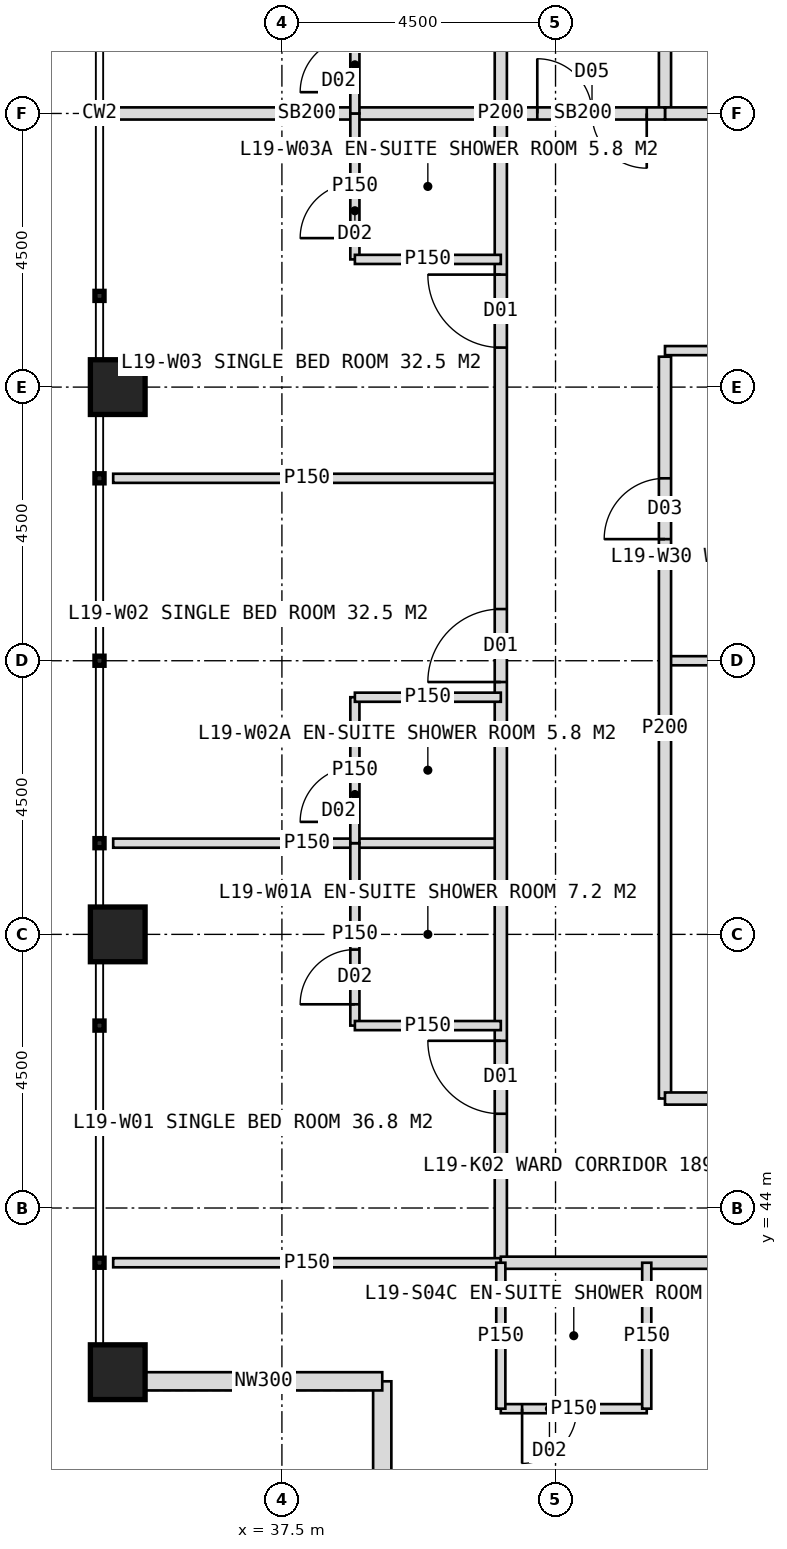
"""IFC4 building model, lengths in metres.
Left out: names, types, materials, properties, quantities, classifications, styles, units other than length and angle.
Written with IfcOpenShell. Run it as: python <this file> out.ifc"""

import sys

from ifc_helpers import new_model, si_unit, direction, frame, frame_2d, origin, origin_2d, place, context, subcontext, project, spatial, rectangle, hollow_rectangle, extrude, element, fill, save


model = new_model("IFC4")
c1 = context("Model", 3, precision=1e-05, world=origin(), true_north=direction((0.0, 1.0)))
c2 = subcontext(c1, "Body", "Model", "MODEL_VIEW")
j1 = project(units=[si_unit("LENGTHUNIT", "METRE"), si_unit("PLANEANGLEUNIT", "RADIAN")], contexts=[c1])
p1 = place(None, origin())
s1 = spatial("IfcSite", under=j1, at=p1, CompositionType="ELEMENT")
p2 = place(p1, origin())
s2 = spatial("IfcBuilding", under=s1, at=p2, CompositionType="ELEMENT")
p3 = place(p2, frame((0.0, 0.0, 83.0)))
s3 = spatial("IfcBuildingStorey", under=s2, at=p3, CompositionType="ELEMENT", Elevation=83.0)
for number, where, z_axis, x_axis in (
    (1, (34.8, 41.3, 0.0), (0.0, 0.0, 1.0), (1.0, 0.0, 0.0)),
    (2, (34.8, 48.5, 0.0), (0.0, 0.0, 1.0), (1.0, 0.0, 0.0)),
    (3, (34.8, 57.5, 0.0), (0.0, 0.0, 1.0), (1.0, 0.0, 0.0)),
):
    element("IfcColumn", number, at=place(p3, frame(where, z_axis=z_axis, x_axis=x_axis)), inside=s3, PredefinedType="COLUMN", context=c2, shape_type="SweptSolid", body=[
        extrude(hollow_rectangle(XDim=0.9, YDim=0.9, WallThickness=0.08, at=origin_2d()), origin(), (0.0, 0.0, 1.0), 4.0),
    ])
for number, where, z_axis, x_axis in (
    (4, (39.15, 37.25, 0.0), (0.0, 0.0, 1.0), (0.0, 1.0, 0.0)),
    (5, (39.15, 41.15, 0.0), (0.0, 0.0, 1.0), (-1.0, 0.0, 0.0)),
):
    element("IfcWall", number, at=place(p3, frame(where, z_axis=z_axis, x_axis=x_axis)), inside=s3, PredefinedType="ELEMENTEDWALL", context=c2, shape_type="SweptSolid", body=[
        extrude(rectangle(XDim=3.9, YDim=0.3, at=frame_2d((1.95, 0.0))), origin(), (0.0, 0.0, 1.0), 2.95),
    ])
for number, where, z_axis, x_axis in (
    (6, (41.1, 50.0, 0.0), (0.0, 0.0, 1.0), (-1.0, 0.0, 0.0)),
    (7, (41.1, 56.0, 0.0), (0.0, 0.0, 1.0), (-1.0, 0.0, 0.0)),
):
    element("IfcWall", number, at=place(p3, frame(where, z_axis=z_axis, x_axis=x_axis)), inside=s3, PredefinedType="PARTITIONING", context=c2, shape_type="SweptSolid", body=[
        extrude(rectangle(XDim=6.375, YDim=0.15, at=frame_2d((3.188, 0.0))), origin(), (0.0, 0.0, 1.0), 3.75),
    ])
p4 = place(p3, frame((41.1, 62.0, 0.0), z_axis=(0.0, 0.0, 1.0), x_axis=(-1.0, 0.0, 0.0)))
e8 = element("IfcWall", 8, at=p4, inside=s3, PredefinedType="SOLIDWALL", context=c2, shape_type="SweptSolid", body=[
    extrude(rectangle(XDim=6.375, YDim=0.2, at=frame_2d((3.188, 0.0))), origin(), (0.0, 0.0, 1.0), 2.75),
])
p5 = place(p3, frame((41.1, 43.1, 0.0), z_axis=(0.0, 0.0, 1.0), x_axis=(0.0, 1.0, 0.0)))
e9 = element("IfcWall", 9, at=p5, inside=s3, PredefinedType="PARTITIONING", context=c2, shape_type="SweptSolid", body=[
    extrude(rectangle(XDim=37.8, YDim=0.2, at=frame_2d((18.9, 0.0))), origin(), (0.0, 0.0, 1.0), 3.75),
])
p6 = place(p5, frame((2.45, 0.0, 0.0)))
e10 = element("IfcOpeningElement", 10, at=p6, cuts=e9, PredefinedType="OPENING", context=c2, shape_type="SweptSolid", body=[
    extrude(rectangle(XDim=1.2, YDim=2.2, at=frame_2d((0.6, 1.1))), frame((0.0, 0.11, 0.0), z_axis=(0.0, -1.0, 0.0), x_axis=(1.0, 0.0, 0.0)), (0.0, 0.0, 1.0), 0.22),
])
p7 = place(p5, frame((9.55, 0.0, 0.0)))
e11 = element("IfcOpeningElement", 11, at=p7, cuts=e9, PredefinedType="OPENING", context=c2, shape_type="SweptSolid", body=[
    extrude(rectangle(XDim=1.2, YDim=2.2, at=frame_2d((0.6, 1.1))), frame((0.0, 0.11, 0.0), z_axis=(0.0, -1.0, 0.0), x_axis=(1.0, 0.0, 0.0)), (0.0, 0.0, 1.0), 0.22),
])
p8 = place(p5, frame((15.05, 0.0, 0.0)))
e12 = element("IfcOpeningElement", 12, at=p8, cuts=e9, PredefinedType="OPENING", context=c2, shape_type="SweptSolid", body=[
    extrude(rectangle(XDim=1.2, YDim=2.2, at=frame_2d((0.6, 1.1))), frame((0.0, 0.11, 0.0), z_axis=(0.0, -1.0, 0.0), x_axis=(1.0, 0.0, 0.0)), (0.0, 0.0, 1.0), 0.22),
])
p9 = place(p5, frame((21.55, 0.0, 0.0)))
e13 = element("IfcOpeningElement", 13, at=p9, cuts=e9, PredefinedType="OPENING", context=c2, shape_type="SweptSolid", body=[
    extrude(rectangle(XDim=1.2, YDim=2.2, at=frame_2d((0.6, 1.1))), frame((0.0, 0.11, 0.0), z_axis=(0.0, -1.0, 0.0), x_axis=(1.0, 0.0, 0.0)), (0.0, 0.0, 1.0), 0.22),
])
p10 = place(p5, frame((33.95, 0.0, 0.0)))
e14 = element("IfcOpeningElement", 14, at=p10, cuts=e9, PredefinedType="OPENING", context=c2, shape_type="SweptSolid", body=[
    extrude(rectangle(XDim=1.2, YDim=2.2, at=frame_2d((0.6, 1.1))), frame((0.0, 0.11, 0.0), z_axis=(0.0, -1.0, 0.0), x_axis=(1.0, 0.0, 0.0)), (0.0, 0.0, 1.0), 0.22),
])
p11 = place(p3, frame((41.1, 43.1, 0.0), z_axis=(0.0, 0.0, 1.0), x_axis=(-1.0, 0.0, 0.0)))
e15 = element("IfcWall", 15, at=p11, inside=s3, PredefinedType="PARTITIONING", context=c2, shape_type="SweptSolid", body=[
    extrude(rectangle(XDim=6.375, YDim=0.15, at=frame_2d((3.188, 0.0))), origin(), (0.0, 0.0, 1.0), 3.75),
])
p12 = place(p3, frame((38.7, 47.0, 0.0), z_axis=(0.0, 0.0, 1.0), x_axis=(0.0, 1.0, 0.0)))
e16 = element("IfcWall", 16, at=p12, inside=s3, PredefinedType="PARTITIONING", context=c2, shape_type="SweptSolid", body=[
    extrude(rectangle(XDim=3.0, YDim=0.15, at=frame_2d((1.5, 0.0))), origin(), (0.0, 0.0, 1.0), 3.75),
])
p13 = place(p12, frame((0.35, 0.0, 0.0)))
e17 = element("IfcOpeningElement", 17, at=p13, cuts=e16, PredefinedType="OPENING", context=c2, shape_type="SweptSolid", body=[
    extrude(rectangle(XDim=0.9, YDim=2.1, at=frame_2d((0.45, 1.05))), frame((0.0, 0.085, 0.0), z_axis=(0.0, -1.0, 0.0), x_axis=(1.0, 0.0, 0.0)), (0.0, 0.0, 1.0), 0.17),
])
p14 = place(p3, frame((41.1, 47.0, 0.0), z_axis=(0.0, 0.0, 1.0), x_axis=(-1.0, 0.0, 0.0)))
e18 = element("IfcWall", 18, at=p14, inside=s3, PredefinedType="PARTITIONING", context=c2, shape_type="SweptSolid", body=[
    extrude(rectangle(XDim=2.4, YDim=0.15, at=frame_2d((1.2, 0.0))), origin(), (0.0, 0.0, 1.0), 3.75),
])
p15 = place(p3, frame((38.7, 50.0, 0.0), z_axis=(0.0, 0.0, 1.0), x_axis=(0.0, 1.0, 0.0)))
e19 = element("IfcWall", 19, at=p15, inside=s3, PredefinedType="PARTITIONING", context=c2, shape_type="SweptSolid", body=[
    extrude(rectangle(XDim=2.4, YDim=0.15, at=frame_2d((1.2, 0.0))), origin(), (0.0, 0.0, 1.0), 3.75),
])
p16 = place(p15, frame((0.35, 0.0, 0.0)))
e20 = element("IfcOpeningElement", 20, at=p16, cuts=e19, PredefinedType="OPENING", context=c2, shape_type="SweptSolid", body=[
    extrude(rectangle(XDim=0.9, YDim=2.1, at=frame_2d((0.45, 1.05))), frame((0.0, 0.085, 0.0), z_axis=(0.0, -1.0, 0.0), x_axis=(1.0, 0.0, 0.0)), (0.0, 0.0, 1.0), 0.17),
])
p17 = place(p3, frame((41.1, 52.4, 0.0), z_axis=(0.0, 0.0, 1.0), x_axis=(-1.0, 0.0, 0.0)))
e21 = element("IfcWall", 21, at=p17, inside=s3, PredefinedType="PARTITIONING", context=c2, shape_type="SweptSolid", body=[
    extrude(rectangle(XDim=2.4, YDim=0.15, at=frame_2d((1.2, 0.0))), origin(), (0.0, 0.0, 1.0), 3.75),
])
p18 = place(p3, frame((38.7, 59.6, 0.0), z_axis=(0.0, 0.0, 1.0), x_axis=(0.0, 1.0, 0.0)))
e22 = element("IfcWall", 22, at=p18, inside=s3, PredefinedType="PARTITIONING", context=c2, shape_type="SweptSolid", body=[
    extrude(rectangle(XDim=2.4, YDim=0.15, at=frame_2d((1.2, 0.0))), origin(), (0.0, 0.0, 1.0), 3.75),
])
p19 = place(p18, frame((0.35, 0.0, 0.0)))
e23 = element("IfcOpeningElement", 23, at=p19, cuts=e22, PredefinedType="OPENING", context=c2, shape_type="SweptSolid", body=[
    extrude(rectangle(XDim=0.9, YDim=2.1, at=frame_2d((0.45, 1.05))), frame((0.0, 0.085, 0.0), z_axis=(0.0, -1.0, 0.0), x_axis=(1.0, 0.0, 0.0)), (0.0, 0.0, 1.0), 0.17),
])
p20 = place(p3, frame((41.1, 59.6, 0.0), z_axis=(0.0, 0.0, 1.0), x_axis=(-1.0, 0.0, 0.0)))
e24 = element("IfcWall", 24, at=p20, inside=s3, PredefinedType="PARTITIONING", context=c2, shape_type="SweptSolid", body=[
    extrude(rectangle(XDim=2.4, YDim=0.15, at=frame_2d((1.2, 0.0))), origin(), (0.0, 0.0, 1.0), 3.75),
])
p21 = place(p3, frame((38.7, 62.0, 0.0), z_axis=(0.0, 0.0, 1.0), x_axis=(0.0, 1.0, 0.0)))
e25 = element("IfcWall", 25, at=p21, inside=s3, PredefinedType="PARTITIONING", context=c2, shape_type="SweptSolid", body=[
    extrude(rectangle(XDim=2.4, YDim=0.15, at=frame_2d((1.2, 0.0))), origin(), (0.0, 0.0, 1.0), 3.75),
])
p22 = place(p21, frame((0.35, 0.0, 0.0)))
e26 = element("IfcOpeningElement", 26, at=p22, cuts=e25, PredefinedType="OPENING", context=c2, shape_type="SweptSolid", body=[
    extrude(rectangle(XDim=0.9, YDim=2.1, at=frame_2d((0.45, 1.05))), frame((0.0, 0.085, 0.0), z_axis=(0.0, -1.0, 0.0), x_axis=(1.0, 0.0, 0.0)), (0.0, 0.0, 1.0), 0.17),
])
p23 = place(p3, frame((51.0, 53.0, 0.0), z_axis=(0.0, 0.0, 1.0), x_axis=(-1.0, 0.0, 0.0)))
e27 = element("IfcWall", 27, at=p23, inside=s3, PredefinedType="PARTITIONING", context=c2, shape_type="SweptSolid", body=[
    extrude(rectangle(XDim=7.2, YDim=0.15, at=frame_2d((3.6, 0.0))), origin(), (0.0, 0.0, 1.0), 3.75),
])
p24 = place(p3, frame((43.8, 45.8, 0.0), z_axis=(0.0, 0.0, 1.0), x_axis=(0.0, 1.0, 0.0)))
e28 = element("IfcWall", 28, at=p24, inside=s3, PredefinedType="PARTITIONING", context=c2, shape_type="SweptSolid", body=[
    extrude(rectangle(XDim=12.2, YDim=0.2, at=frame_2d((6.1, 0.0))), origin(), (0.0, 0.0, 1.0), 3.75),
])
p25 = place(p24, frame((9.2, 0.0, 0.0)))
e29 = element("IfcOpeningElement", 29, at=p25, cuts=e28, PredefinedType="OPENING", context=c2, shape_type="SweptSolid", body=[
    extrude(rectangle(XDim=1.0, YDim=2.1, at=frame_2d((0.5, 1.05))), frame((0.0, 0.11, 0.0), z_axis=(0.0, -1.0, 0.0), x_axis=(1.0, 0.0, 0.0)), (0.0, 0.0, 1.0), 0.22),
])
p26 = place(p3, frame((43.8, 62.0, 0.0), z_axis=(0.0, 0.0, 1.0), x_axis=(0.0, 1.0, 0.0)))
e30 = element("IfcWall", 30, at=p26, inside=s3, PredefinedType="PARTITIONING", context=c2, shape_type="SweptSolid", body=[
    extrude(rectangle(XDim=16.2, YDim=0.2, at=frame_2d((8.1, 0.0))), origin(), (0.0, 0.0, 1.0), 3.75),
])
p27 = place(p26, frame((3.25, 0.0, 0.0)))
e31 = element("IfcOpeningElement", 31, at=p27, cuts=e30, PredefinedType="OPENING", context=c2, shape_type="SweptSolid", body=[
    extrude(rectangle(XDim=1.0, YDim=2.1, at=frame_2d((0.5, 1.05))), frame((0.0, 0.11, 0.0), z_axis=(0.0, -1.0, 0.0), x_axis=(1.0, 0.0, 0.0)), (0.0, 0.0, 1.0), 0.22),
])
p28 = place(p26, frame((9.25, 0.0, 0.0)))
e32 = element("IfcOpeningElement", 32, at=p28, cuts=e30, PredefinedType="OPENING", context=c2, shape_type="SweptSolid", body=[
    extrude(rectangle(XDim=1.0, YDim=2.1, at=frame_2d((0.5, 1.05))), frame((0.0, 0.11, 0.0), z_axis=(0.0, -1.0, 0.0), x_axis=(1.0, 0.0, 0.0)), (0.0, 0.0, 1.0), 0.22),
])
p29 = place(p26, frame((13.6, 0.0, 0.0)))
e33 = element("IfcOpeningElement", 33, at=p29, cuts=e30, PredefinedType="OPENING", context=c2, shape_type="SweptSolid", body=[
    extrude(rectangle(XDim=1.0, YDim=2.1, at=frame_2d((0.5, 1.05))), frame((0.0, 0.11, 0.0), z_axis=(0.0, -1.0, 0.0), x_axis=(1.0, 0.0, 0.0)), (0.0, 0.0, 1.0), 0.22),
])
p30 = place(p3, frame((51.0, 58.1, 0.0), z_axis=(0.0, 0.0, 1.0), x_axis=(-1.0, 0.0, 0.0)))
e34 = element("IfcWall", 34, at=p30, inside=s3, PredefinedType="PARTITIONING", context=c2, shape_type="SweptSolid", body=[
    extrude(rectangle(XDim=7.2, YDim=0.15, at=frame_2d((3.6, 0.0))), origin(), (0.0, 0.0, 1.0), 3.75),
])
p31 = place(p30, frame((0.6, 0.0, 0.0)))
e35 = element("IfcOpeningElement", 35, at=p31, cuts=e34, PredefinedType="OPENING", context=c2, shape_type="SweptSolid", body=[
    extrude(rectangle(XDim=0.9, YDim=2.1, at=frame_2d((0.45, 1.05))), frame((0.0, 0.085, 0.0), z_axis=(0.0, -1.0, 0.0), x_axis=(1.0, 0.0, 0.0)), (0.0, 0.0, 1.0), 0.17),
])
p32 = place(p3, frame((51.0, 62.0, 0.0), z_axis=(0.0, 0.0, 1.0), x_axis=(-1.0, 0.0, 0.0)))
e36 = element("IfcWall", 36, at=p32, inside=s3, PredefinedType="SOLIDWALL", context=c2, shape_type="SweptSolid", body=[
    extrude(rectangle(XDim=7.2, YDim=0.2, at=frame_2d((3.6, 0.0))), origin(), (0.0, 0.0, 1.0), 2.75),
])
p33 = place(p3, frame((78.9, 43.1, 0.0), z_axis=(0.0, 0.0, 1.0), x_axis=(-1.0, 0.0, 0.0)))
e37 = element("IfcWall", 37, at=p33, inside=s3, PredefinedType="PARTITIONING", context=c2, shape_type="SweptSolid", body=[
    extrude(rectangle(XDim=37.8, YDim=0.2, at=frame_2d((18.9, 0.0))), origin(), (0.0, 0.0, 1.0), 3.75),
])
p34 = place(p33, frame((6.05, 0.0, 0.0)))
e38 = element("IfcOpeningElement", 38, at=p34, cuts=e37, PredefinedType="OPENING", context=c2, shape_type="SweptSolid", body=[
    extrude(rectangle(XDim=1.2, YDim=2.2, at=frame_2d((0.6, 1.1))), frame((0.0, 0.11, 0.0), z_axis=(0.0, -1.0, 0.0), x_axis=(1.0, 0.0, 0.0)), (0.0, 0.0, 1.0), 0.22),
])
p35 = place(p33, frame((12.55, 0.0, 0.0)))
e39 = element("IfcOpeningElement", 39, at=p35, cuts=e37, PredefinedType="OPENING", context=c2, shape_type="SweptSolid", body=[
    extrude(rectangle(XDim=1.2, YDim=2.2, at=frame_2d((0.6, 1.1))), frame((0.0, 0.11, 0.0), z_axis=(0.0, -1.0, 0.0), x_axis=(1.0, 0.0, 0.0)), (0.0, 0.0, 1.0), 0.22),
])
p36 = place(p33, frame((21.05, 0.0, 0.0)))
e40 = element("IfcOpeningElement", 40, at=p36, cuts=e37, PredefinedType="OPENING", context=c2, shape_type="SweptSolid", body=[
    extrude(rectangle(XDim=1.2, YDim=2.2, at=frame_2d((0.6, 1.1))), frame((0.0, 0.11, 0.0), z_axis=(0.0, -1.0, 0.0), x_axis=(1.0, 0.0, 0.0)), (0.0, 0.0, 1.0), 0.22),
])
p37 = place(p33, frame((27.55, 0.0, 0.0)))
e41 = element("IfcOpeningElement", 41, at=p37, cuts=e37, PredefinedType="OPENING", context=c2, shape_type="SweptSolid", body=[
    extrude(rectangle(XDim=1.2, YDim=2.2, at=frame_2d((0.6, 1.1))), frame((0.0, 0.11, 0.0), z_axis=(0.0, -1.0, 0.0), x_axis=(1.0, 0.0, 0.0)), (0.0, 0.0, 1.0), 0.22),
])
p38 = place(p3, frame((43.5, 40.7, 0.0), z_axis=(0.0, 0.0, 1.0), x_axis=(-1.0, 0.0, 0.0)))
e42 = element("IfcWall", 42, at=p38, inside=s3, PredefinedType="PARTITIONING", context=c2, shape_type="SweptSolid", body=[
    extrude(rectangle(XDim=2.4, YDim=0.15, at=frame_2d((1.2, 0.0))), origin(), (0.0, 0.0, 1.0), 3.75),
])
p39 = place(p38, frame((1.15, 0.0, 0.0)))
e43 = element("IfcOpeningElement", 43, at=p39, cuts=e42, PredefinedType="OPENING", context=c2, shape_type="SweptSolid", body=[
    extrude(rectangle(XDim=0.9, YDim=2.1, at=frame_2d((0.45, 1.05))), frame((0.0, 0.085, 0.0), z_axis=(0.0, -1.0, 0.0), x_axis=(1.0, 0.0, 0.0)), (0.0, 0.0, 1.0), 0.17),
])
for number, where, z_axis, x_axis in (
    (44, (43.5, 43.1, 0.0), (0.0, 0.0, 1.0), (0.0, -1.0, 0.0)),
    (45, (41.1, 43.1, 0.0), (0.0, 0.0, 1.0), (0.0, -1.0, 0.0)),
):
    element("IfcWall", number, at=place(p3, frame(where, z_axis=z_axis, x_axis=x_axis)), inside=s3, PredefinedType="PARTITIONING", context=c2, shape_type="SweptSolid", body=[
        extrude(rectangle(XDim=2.4, YDim=0.15, at=frame_2d((1.2, 0.0))), origin(), (0.0, 0.0, 1.0), 3.75),
    ])
p40 = place(p3, frame((57.75, 45.8, 0.0), z_axis=(0.0, 0.0, 1.0), x_axis=(-1.0, 0.0, 0.0)))
e46 = element("IfcWall", 46, at=p40, inside=s3, PredefinedType="PARTITIONING", context=c2, shape_type="SweptSolid", body=[
    extrude(rectangle(XDim=13.95, YDim=0.2, at=frame_2d((6.975, 0.0))), origin(), (0.0, 0.0, 1.0), 3.75),
])
p41 = place(p40, frame((3.625, 0.0, 0.0)))
e47 = element("IfcOpeningElement", 47, at=p41, cuts=e46, PredefinedType="OPENING", context=c2, shape_type="SweptSolid", body=[
    extrude(rectangle(XDim=1.0, YDim=2.1, at=frame_2d((0.5, 1.05))), frame((0.0, 0.11, 0.0), z_axis=(0.0, -1.0, 0.0), x_axis=(1.0, 0.0, 0.0)), (0.0, 0.0, 1.0), 0.22),
])
p42 = place(p40, frame((10.6, 0.0, 0.0)))
e48 = element("IfcOpeningElement", 48, at=p42, cuts=e46, PredefinedType="OPENING", context=c2, shape_type="SweptSolid", body=[
    extrude(rectangle(XDim=1.0, YDim=2.1, at=frame_2d((0.5, 1.05))), frame((0.0, 0.11, 0.0), z_axis=(0.0, -1.0, 0.0), x_axis=(1.0, 0.0, 0.0)), (0.0, 0.0, 1.0), 0.22),
])
p43 = place(p3, frame((43.8, 62.0, 0.0), z_axis=(0.0, 0.0, 1.0), x_axis=(-1.0, 0.0, 0.0)))
e49 = element("IfcWall", 49, at=p43, inside=s3, PredefinedType="SOLIDWALL", context=c2, shape_type="SweptSolid", body=[
    extrude(rectangle(XDim=2.7, YDim=0.2, at=frame_2d((1.35, 0.0))), origin(), (0.0, 0.0, 1.0), 2.75),
])
p44 = place(p43, frame((0.3, 0.0, 0.0)))
e50 = element("IfcOpeningElement", 50, at=p44, cuts=e49, PredefinedType="OPENING", context=c2, shape_type="SweptSolid", body=[
    extrude(rectangle(XDim=1.8, YDim=2.2, at=frame_2d((0.9, 1.1))), frame((0.0, 0.11, 0.0), z_axis=(0.0, -1.0, 0.0), x_axis=(1.0, 0.0, 0.0)), (0.0, 0.0, 1.0), 0.22),
])
p45 = place(p6, origin())
e51 = element("IfcDoor", 51, at=p45, inside=s3, OperationType="SINGLE_SWING_RIGHT", PredefinedType="DOOR", context=c2, shape_type="SweptSolid", body=[
    extrude(rectangle(XDim=1.2, YDim=2.2, at=frame_2d((0.6, 1.1))), frame((0.0, 0.025, 0.0), z_axis=(0.0, -1.0, 0.0), x_axis=(1.0, 0.0, 0.0)), (0.0, 0.0, 1.0), 0.05),
])
fill(e10, e51)
p46 = place(p13, origin())
e52 = element("IfcDoor", 52, at=p46, inside=s3, OperationType="SINGLE_SWING_LEFT", PredefinedType="DOOR", context=c2, shape_type="SweptSolid", body=[
    extrude(rectangle(XDim=0.9, YDim=2.1, at=frame_2d((0.45, 1.05))), frame((0.0, 0.025, 0.0), z_axis=(0.0, -1.0, 0.0), x_axis=(1.0, 0.0, 0.0)), (0.0, 0.0, 1.0), 0.05),
])
fill(e17, e52)
p47 = place(p7, origin())
e53 = element("IfcDoor", 53, at=p47, inside=s3, OperationType="SINGLE_SWING_LEFT", PredefinedType="DOOR", context=c2, shape_type="SweptSolid", body=[
    extrude(rectangle(XDim=1.2, YDim=2.2, at=frame_2d((0.6, 1.1))), frame((0.0, 0.025, 0.0), z_axis=(0.0, -1.0, 0.0), x_axis=(1.0, 0.0, 0.0)), (0.0, 0.0, 1.0), 0.05),
])
fill(e11, e53)
p48 = place(p16, origin())
e54 = element("IfcDoor", 54, at=p48, inside=s3, OperationType="SINGLE_SWING_LEFT", PredefinedType="DOOR", context=c2, shape_type="SweptSolid", body=[
    extrude(rectangle(XDim=0.9, YDim=2.1, at=frame_2d((0.45, 1.05))), frame((0.0, 0.025, 0.0), z_axis=(0.0, -1.0, 0.0), x_axis=(1.0, 0.0, 0.0)), (0.0, 0.0, 1.0), 0.05),
])
fill(e20, e54)
p49 = place(p8, origin())
e55 = element("IfcDoor", 55, at=p49, inside=s3, OperationType="SINGLE_SWING_RIGHT", PredefinedType="DOOR", context=c2, shape_type="SweptSolid", body=[
    extrude(rectangle(XDim=1.2, YDim=2.2, at=frame_2d((0.6, 1.1))), frame((0.0, 0.025, 0.0), z_axis=(0.0, -1.0, 0.0), x_axis=(1.0, 0.0, 0.0)), (0.0, 0.0, 1.0), 0.05),
])
fill(e12, e55)
p50 = place(p19, origin())
e56 = element("IfcDoor", 56, at=p50, inside=s3, OperationType="SINGLE_SWING_LEFT", PredefinedType="DOOR", context=c2, shape_type="SweptSolid", body=[
    extrude(rectangle(XDim=0.9, YDim=2.1, at=frame_2d((0.45, 1.05))), frame((0.0, 0.025, 0.0), z_axis=(0.0, -1.0, 0.0), x_axis=(1.0, 0.0, 0.0)), (0.0, 0.0, 1.0), 0.05),
])
fill(e23, e56)
p51 = place(p22, origin())
e57 = element("IfcDoor", 57, at=p51, inside=s3, OperationType="SINGLE_SWING_LEFT", PredefinedType="DOOR", context=c2, shape_type="SweptSolid", body=[
    extrude(rectangle(XDim=0.9, YDim=2.1, at=frame_2d((0.45, 1.05))), frame((0.0, 0.025, 0.0), z_axis=(0.0, -1.0, 0.0), x_axis=(1.0, 0.0, 0.0)), (0.0, 0.0, 1.0), 0.05),
])
fill(e26, e57)
p52 = place(p25, origin())
e58 = element("IfcDoor", 58, at=p52, inside=s3, OperationType="SINGLE_SWING_LEFT", PredefinedType="DOOR", context=c2, shape_type="SweptSolid", body=[
    extrude(rectangle(XDim=1.0, YDim=2.1, at=frame_2d((0.5, 1.05))), frame((0.0, 0.025, 0.0), z_axis=(0.0, -1.0, 0.0), x_axis=(1.0, 0.0, 0.0)), (0.0, 0.0, 1.0), 0.05),
])
fill(e29, e58)
p53 = place(p39, origin())
e59 = element("IfcDoor", 59, at=p53, inside=s3, OperationType="SINGLE_SWING_RIGHT", PredefinedType="DOOR", context=c2, shape_type="SweptSolid", body=[
    extrude(rectangle(XDim=0.9, YDim=2.1, at=frame_2d((0.45, 1.05))), frame((0.0, 0.025, 0.0), z_axis=(0.0, -1.0, 0.0), x_axis=(1.0, 0.0, 0.0)), (0.0, 0.0, 1.0), 0.05),
])
fill(e43, e59)
p54 = place(p44, origin())
e60 = element("IfcDoor", 60, at=p54, inside=s3, OperationType="DOUBLE_DOOR_DOUBLE_SWING", PredefinedType="DOOR", context=c2, shape_type="SweptSolid", body=[
    extrude(rectangle(XDim=1.8, YDim=2.2, at=frame_2d((0.9, 1.1))), frame((0.0, 0.025, 0.0), z_axis=(0.0, -1.0, 0.0), x_axis=(1.0, 0.0, 0.0)), (0.0, 0.0, 1.0), 0.05),
])
fill(e50, e60)
save(model, sys.argv[1])
